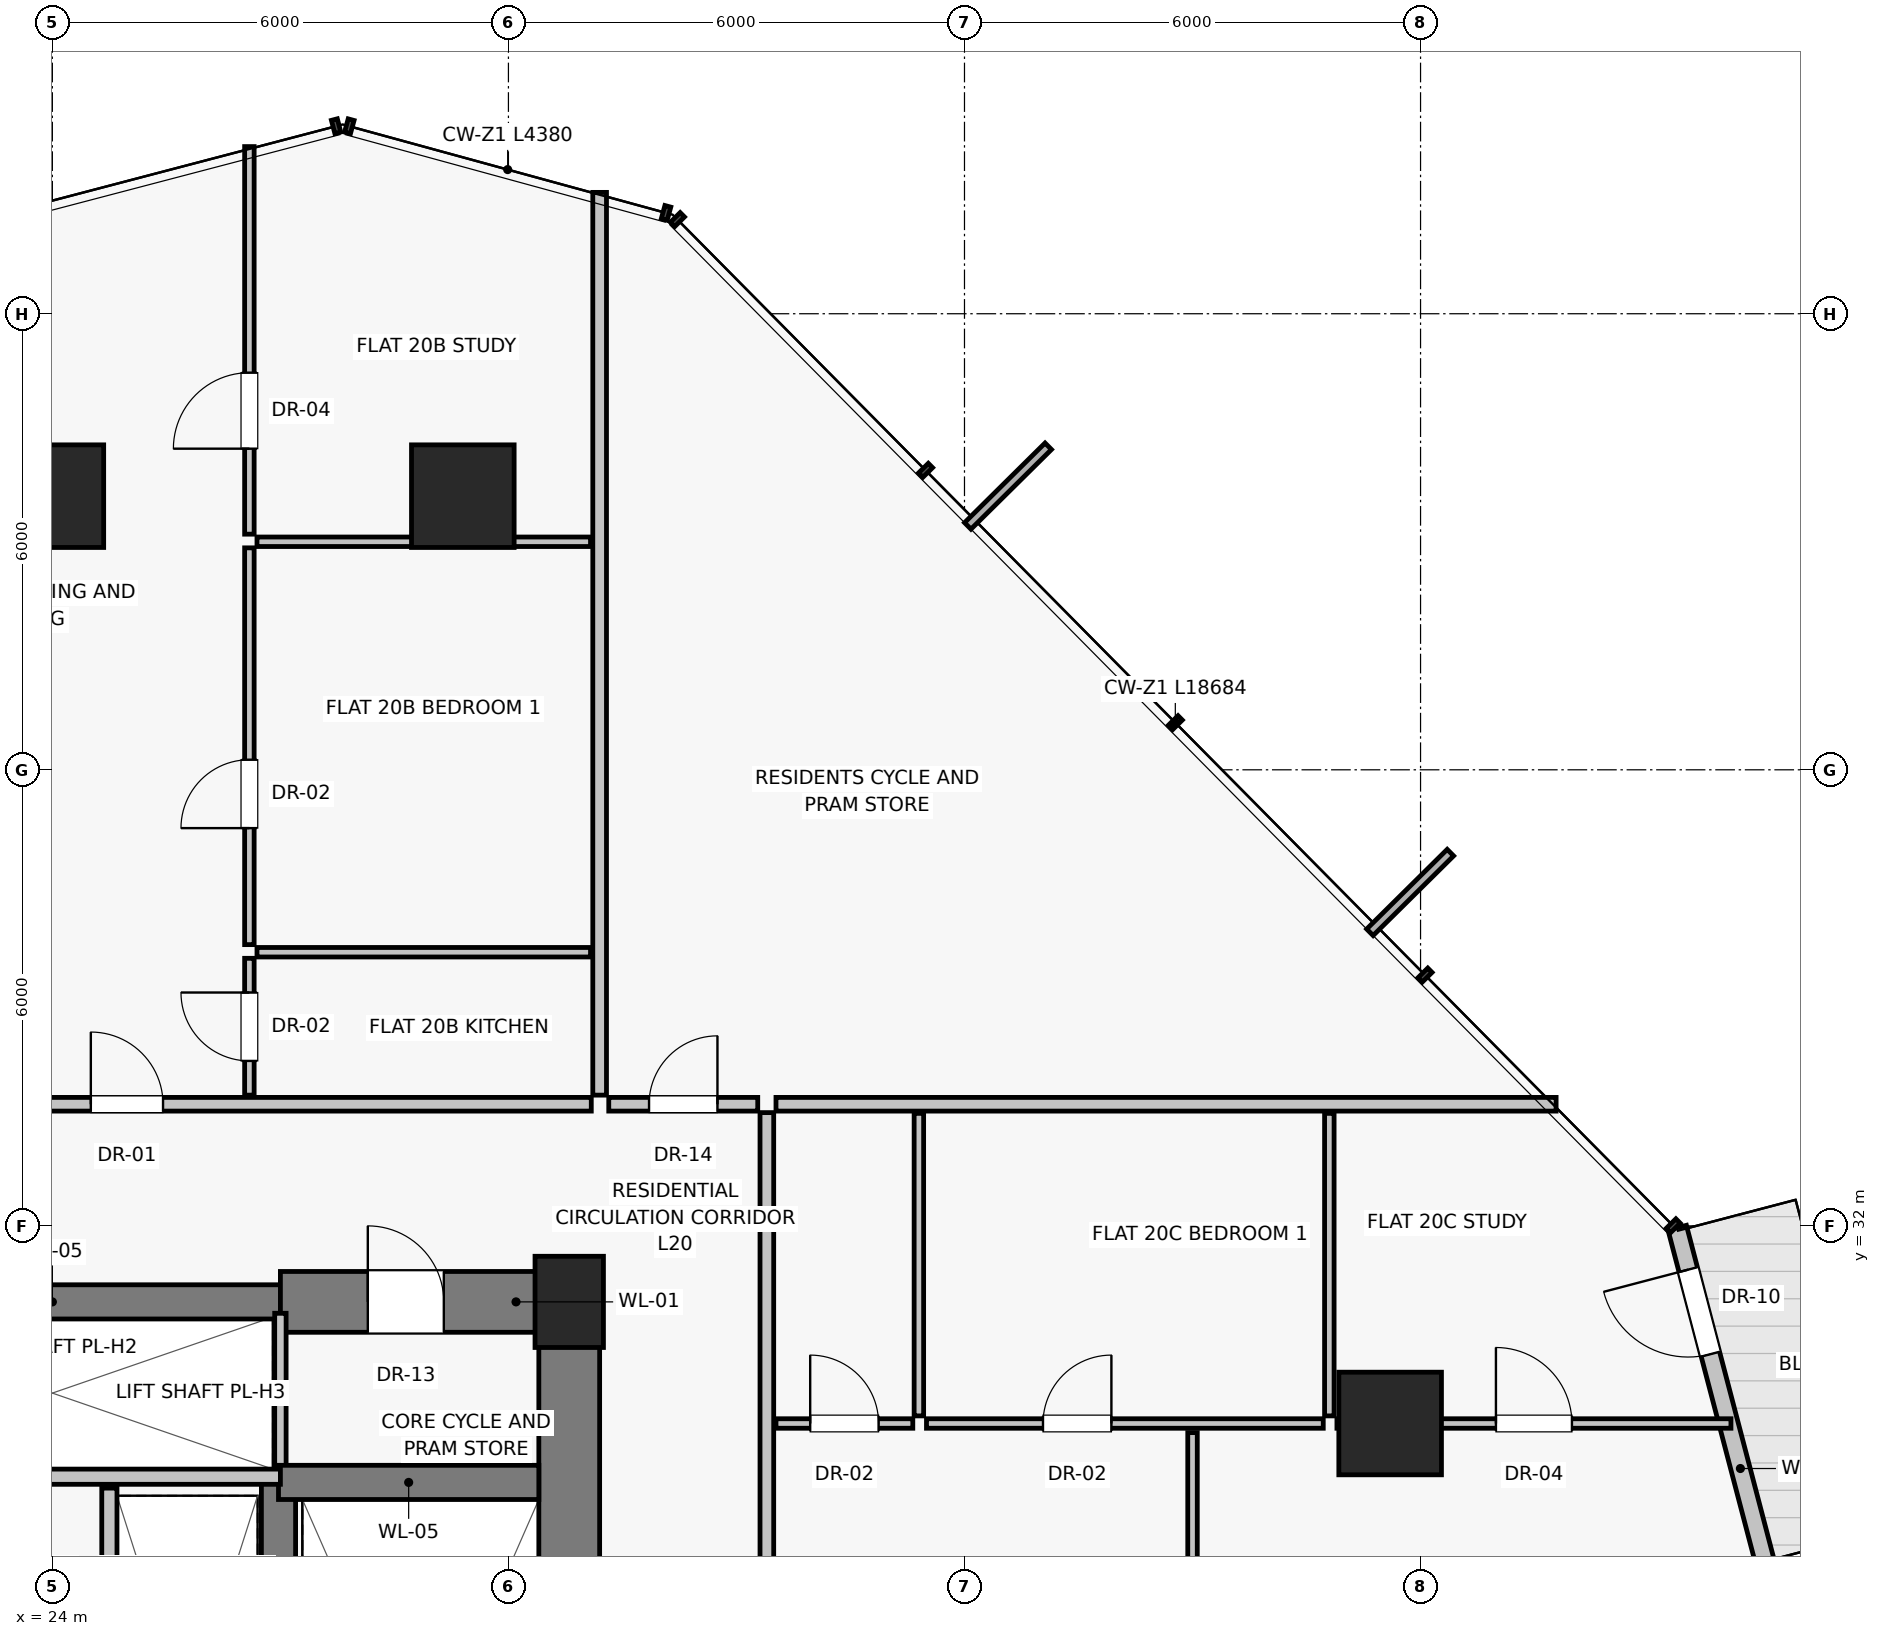
"""IFC4 building model, lengths in metres.
Left out: names, types, materials, properties, quantities, classifications, styles, units other than length and angle.
Written with IfcOpenShell. Run it as: python <this file> out.ifc"""

import sys

from ifc_helpers import new_model, si_unit, direction, frame, frame_2d, origin, origin_2d, place, context, subcontext, project, spatial, rectangle, extrude, source, transform, mapped, element, fill, save


model = new_model("IFC4")
c1 = context("Model", 3, precision=1e-05, world=origin(), true_north=direction((0.0, 1.0)))
c2 = subcontext(c1, "Body", "Model", "MODEL_VIEW")
j1 = project(units=[si_unit("LENGTHUNIT", "METRE"), si_unit("PLANEANGLEUNIT", "RADIAN")], contexts=[c1])
p1 = place(None, origin())
s1 = spatial("IfcSite", under=j1, at=p1, CompositionType="ELEMENT")
p2 = place(p1, origin())
s2 = spatial("IfcBuilding", under=s1, at=p2, CompositionType="ELEMENT")
p3 = place(p2, frame((0.0, 0.0, 73.85)))
s3 = spatial("IfcBuildingStorey", under=s2, at=p3, CompositionType="ELEMENT", Elevation=73.85)
p4 = place(p3, frame((30.8, 31.0, 0.0), z_axis=(0.0, 0.0, 1.0), x_axis=(1.0, 0.0, 0.0)))
e1 = element("IfcColumn", 1, at=p4, inside=s3, PredefinedType="PILASTER", context=c2, shape_type="SweptSolid", body=[
    extrude(rectangle(XDim=0.9, YDim=1.2, at=origin_2d()), origin(), (0.0, 0.0, 1.0), 3.25),
])
for number, where, z_axis, x_axis in (
    (2, (41.6, 29.4, 0.0), (0.0, 0.0, 1.0), (1.0, 0.0, 0.0)),
    (3, (29.4, 41.6, 0.0), (0.0, 0.0, 1.0), (1.0, 0.0, 0.0)),
    (4, (24.0, 41.6, 0.0), (0.0, 0.0, 1.0), (1.0, 0.0, 0.0)),
):
    element("IfcColumn", number, at=place(p3, frame(where, z_axis=z_axis, x_axis=x_axis)), inside=s3, PredefinedType="COLUMN", context=c2, shape_type="SweptSolid", body=[
        extrude(rectangle(XDim=1.35, YDim=1.35, at=origin_2d()), origin(), (0.0, 0.0, 1.0), 3.25),
    ])
p5 = place(p3, frame((46.539, 27.545, 0.0), z_axis=(0.0, 0.0, 1.0), x_axis=(-0.253782183119, 0.967261393591, 0.0)))
e5 = element("IfcWall", 5, at=p5, inside=s3, PredefinedType="SOLIDWALL", context=c2, shape_type="SweptSolid", body=[
    extrude(rectangle(XDim=4.58, YDim=0.25, at=frame_2d((2.29, 0.0))), origin(), (0.0, 0.0, 1.0), 3.0),
])
p6 = place(p5, frame((2.86, 0.0, 0.0)))
e6 = element("IfcOpeningElement", 6, at=p6, cuts=e5, PredefinedType="OPENING", context=c2, shape_type="SweptSolid", body=[
    extrude(rectangle(XDim=1.15, YDim=2.25, at=frame_2d((0.575, 1.125))), frame((0.0, 0.135, 0.0), z_axis=(0.0, -1.0, 0.0), x_axis=(1.0, 0.0, 0.0)), (0.0, 0.0, 1.0), 0.27),
])
p7 = place(p3, frame((30.8, 16.8, 0.0), z_axis=(0.0, 0.0, 1.0), x_axis=(0.0, 1.0, 0.0)))
e7 = element("IfcWall", 7, at=p7, inside=s3, PredefinedType="SHEAR", context=c2, shape_type="SweptSolid", body=[
    extrude(rectangle(XDim=14.2, YDim=0.8, at=frame_2d((7.1, 0.0))), origin(), (0.0, 0.0, 1.0), 3.0),
])
p8 = place(p3, frame((21.0, 31.0, 0.0), z_axis=(0.0, 0.0, 1.0), x_axis=(1.0, 0.0, 0.0)))
e8 = element("IfcWall", 8, at=p8, inside=s3, PredefinedType="SHEAR", context=c2, shape_type="SweptSolid", body=[
    extrude(rectangle(XDim=6.0, YDim=0.45, at=frame_2d((3.0, 0.0))), origin(), (0.0, 0.0, 1.0), 3.0),
])
p9 = place(p3, frame((27.0, 31.0, 0.0), z_axis=(0.0, 0.0, 1.0), x_axis=(1.0, 0.0, 0.0)))
e9 = element("IfcWall", 9, at=p9, inside=s3, PredefinedType="SHEAR", context=c2, shape_type="SweptSolid", body=[
    extrude(rectangle(XDim=3.8, YDim=0.8, at=frame_2d((1.9, 0.0))), origin(), (0.0, 0.0, 1.0), 3.0),
])
p10 = place(p9, frame((1.15, 0.0, 0.0)))
e10 = element("IfcOpeningElement", 10, at=p10, cuts=e9, PredefinedType="OPENING", context=c2, shape_type="SweptSolid", body=[
    extrude(rectangle(XDim=1.0, YDim=2.01, at=frame_2d((0.5, 1.005))), frame((0.0, 0.41, 0.0), z_axis=(0.0, -1.0, 0.0), x_axis=(1.0, 0.0, 0.0)), (0.0, 0.0, 1.0), 0.82),
])
p11 = place(p3, frame((27.0, 28.65, 0.0), z_axis=(0.0, 0.0, 1.0), x_axis=(0.0, 1.0, 0.0)))
e11 = element("IfcWall", 11, at=p11, inside=s3, PredefinedType="PARTITIONING", context=c2, shape_type="SweptSolid", body=[
    extrude(rectangle(XDim=2.2, YDim=0.15, at=frame_2d((1.1, 0.0))), origin(), (0.0, 0.0, 1.0), 3.0),
])
p12 = place(p3, frame((26.975, 19.8, 0.0), z_axis=(0.0, 0.0, 1.0), x_axis=(0.0, 1.0, 0.0)))
e12 = element("IfcWall", 12, at=p12, inside=s3, PredefinedType="SHEAR", context=c2, shape_type="SweptSolid", body=[
    extrude(rectangle(XDim=8.825, YDim=0.45, at=frame_2d((4.413, 0.0))), origin(), (0.0, 0.0, 1.0), 3.0),
])
p13 = place(p3, frame((26.975, 28.625, 0.0), z_axis=(0.0, 0.0, 1.0), x_axis=(1.0, 0.0, 0.0)))
e13 = element("IfcWall", 13, at=p13, inside=s3, PredefinedType="SHEAR", context=c2, shape_type="SweptSolid", body=[
    extrude(rectangle(XDim=3.425, YDim=0.45, at=frame_2d((1.712, 0.0))), origin(), (0.0, 0.0, 1.0), 3.0),
])
p14 = place(p3, frame((21.0, 28.7, 0.0), z_axis=(0.0, 0.0, 1.0), x_axis=(1.0, 0.0, 0.0)))
e14 = element("IfcWall", 14, at=p14, inside=s3, PredefinedType="SOLIDWALL", context=c2, shape_type="SweptSolid", body=[
    extrude(rectangle(XDim=6.0, YDim=0.2, at=frame_2d((3.0, 0.0))), origin(), (0.0, 0.0, 1.0), 3.0),
])
p15 = place(p3, frame((24.75, 22.6, 0.0), z_axis=(0.0, 0.0, 1.0), x_axis=(0.0, 1.0, 0.0)))
e15 = element("IfcWall", 15, at=p15, inside=s3, PredefinedType="SOLIDWALL", context=c2, shape_type="SweptSolid", body=[
    extrude(rectangle(XDim=5.95, YDim=0.2, at=frame_2d((2.975, 0.0))), origin(), (0.0, 0.0, 1.0), 3.0),
])
p16 = place(p3, frame((31.2, 33.72, 0.0), z_axis=(0.0, 0.0, 1.0), x_axis=(0.0, 1.0, 0.0)))
e16 = element("IfcWall", 16, at=p16, inside=s3, PredefinedType="PARTITIONING", context=c2, shape_type="SweptSolid", body=[
    extrude(rectangle(XDim=11.876, YDim=0.18, at=frame_2d((5.938, 0.0))), origin(), (0.0, 0.0, 1.0), 3.0),
])
p17 = place(p3, frame((21.23, 33.6, 0.0), z_axis=(0.0, 0.0, 1.0), x_axis=(1.0, 0.0, 0.0)))
e17 = element("IfcWall", 17, at=p17, inside=s3, PredefinedType="PARTITIONING", context=c2, shape_type="SweptSolid", body=[
    extrude(rectangle(XDim=9.86, YDim=0.18, at=frame_2d((4.93, 0.0))), origin(), (0.0, 0.0, 1.0), 3.0),
])
p18 = place(p17, frame((3.276, 0.0, 0.0)))
e18 = element("IfcOpeningElement", 18, at=p18, cuts=e17, PredefinedType="OPENING", context=c2, shape_type="SweptSolid", body=[
    extrude(rectangle(XDim=0.95, YDim=2.02, at=frame_2d((0.475, 1.01))), frame((0.0, 0.1, 0.0), z_axis=(0.0, -1.0, 0.0), x_axis=(1.0, 0.0, 0.0)), (0.0, 0.0, 1.0), 0.2),
])
p19 = place(p3, frame((26.692, 41.0, 0.0), z_axis=(0.0, 0.0, 1.0), x_axis=(1.0, 0.0, 0.0)))
e19 = element("IfcWall", 19, at=p19, inside=s3, PredefinedType="PARTITIONING", context=c2, shape_type="SweptSolid", body=[
    extrude(rectangle(XDim=4.388, YDim=0.125, at=frame_2d((2.194, 0.0))), origin(), (0.0, 0.0, 1.0), 2.1),
])
p20 = place(p3, frame((26.592, 41.1, 0.0), z_axis=(0.0, 0.0, 1.0), x_axis=(0.0, 1.0, 0.0)))
e20 = element("IfcWall", 20, at=p20, inside=s3, PredefinedType="PARTITIONING", context=c2, shape_type="SweptSolid", body=[
    extrude(rectangle(XDim=5.099, YDim=0.125, at=frame_2d((2.549, 0.0))), origin(), (0.0, 0.0, 1.0), 3.0),
])
p21 = place(p20, frame((1.125, 0.0, 0.0)))
e21 = element("IfcOpeningElement", 21, at=p21, cuts=e20, PredefinedType="OPENING", context=c2, shape_type="SweptSolid", body=[
    extrude(rectangle(XDim=1.0, YDim=2.01, at=frame_2d((0.5, 1.005))), frame((0.0, 0.073, 0.0), z_axis=(0.0, -1.0, 0.0), x_axis=(1.0, 0.0, 0.0)), (0.0, 0.0, 1.0), 0.145),
])
p22 = place(p3, frame((26.592, 33.72, 0.0), z_axis=(0.0, 0.0, 1.0), x_axis=(0.0, 1.0, 0.0)))
e22 = element("IfcWall", 22, at=p22, inside=s3, PredefinedType="PARTITIONING", context=c2, shape_type="SweptSolid", body=[
    extrude(rectangle(XDim=1.8, YDim=0.125, at=frame_2d((0.9, 0.0))), origin(), (0.0, 0.0, 1.0), 3.0),
])
p23 = place(p22, frame((0.45, 0.0, 0.0)))
e23 = element("IfcOpeningElement", 23, at=p23, cuts=e22, PredefinedType="OPENING", context=c2, shape_type="SweptSolid", body=[
    extrude(rectangle(XDim=0.9, YDim=2.01, at=frame_2d((0.45, 1.005))), frame((0.0, 0.073, 0.0), z_axis=(0.0, -1.0, 0.0), x_axis=(1.0, 0.0, 0.0)), (0.0, 0.0, 1.0), 0.145),
])
p24 = place(p3, frame((26.692, 35.6, 0.0), z_axis=(0.0, 0.0, 1.0), x_axis=(1.0, 0.0, 0.0)))
e24 = element("IfcWall", 24, at=p24, inside=s3, PredefinedType="PARTITIONING", context=c2, shape_type="SweptSolid", body=[
    extrude(rectangle(XDim=4.388, YDim=0.125, at=frame_2d((2.194, 0.0))), origin(), (0.0, 0.0, 1.0), 3.0),
])
p25 = place(p3, frame((26.592, 35.7, 0.0), z_axis=(0.0, 0.0, 1.0), x_axis=(0.0, 1.0, 0.0)))
e25 = element("IfcWall", 25, at=p25, inside=s3, PredefinedType="PARTITIONING", context=c2, shape_type="SweptSolid", body=[
    extrude(rectangle(XDim=5.22, YDim=0.125, at=frame_2d((2.61, 0.0))), origin(), (0.0, 0.0, 1.0), 3.0),
])
p26 = place(p25, frame((1.533, 0.0, 0.0)))
e26 = element("IfcOpeningElement", 26, at=p26, cuts=e25, PredefinedType="OPENING", context=c2, shape_type="SweptSolid", body=[
    extrude(rectangle(XDim=0.9, YDim=2.01, at=frame_2d((0.45, 1.005))), frame((0.0, 0.073, 0.0), z_axis=(0.0, -1.0, 0.0), x_axis=(1.0, 0.0, 0.0)), (0.0, 0.0, 1.0), 0.145),
])
p27 = place(p3, frame((33.52, 33.6, 0.0), z_axis=(0.0, 0.0, 1.0), x_axis=(1.0, 0.0, 0.0)))
e27 = element("IfcWall", 27, at=p27, inside=s3, PredefinedType="PARTITIONING", context=c2, shape_type="SweptSolid", body=[
    extrude(rectangle(XDim=10.263, YDim=0.18, at=frame_2d((5.132, 0.0))), origin(), (0.0, 0.0, 1.0), 3.0),
])
p28 = place(p3, frame((33.4, 18.71, 0.0), z_axis=(0.0, 0.0, 1.0), x_axis=(0.0, 1.0, 0.0)))
e28 = element("IfcWall", 28, at=p28, inside=s3, PredefinedType="PARTITIONING", context=c2, shape_type="SweptSolid", body=[
    extrude(rectangle(XDim=14.78, YDim=0.18, at=frame_2d((7.39, 0.0))), origin(), (0.0, 0.0, 1.0), 3.0),
])
p29 = place(p28, frame((5.94, 0.0, 0.0)))
e29 = element("IfcOpeningElement", 29, at=p29, cuts=e28, PredefinedType="OPENING", context=c2, shape_type="SweptSolid", body=[
    extrude(rectangle(XDim=0.95, YDim=2.02, at=frame_2d((0.475, 1.01))), frame((0.0, 0.1, 0.0), z_axis=(0.0, -1.0, 0.0), x_axis=(1.0, 0.0, 0.0)), (0.0, 0.0, 1.0), 0.2),
])
p30 = place(p3, frame((40.8, 29.5, 0.0), z_axis=(0.0, 0.0, 1.0), x_axis=(0.0, 1.0, 0.0)))
e30 = element("IfcWall", 30, at=p30, inside=s3, PredefinedType="PARTITIONING", context=c2, shape_type="SweptSolid", body=[
    extrude(rectangle(XDim=3.98, YDim=0.125, at=frame_2d((1.99, 0.0))), origin(), (0.0, 0.0, 1.0), 3.0),
])
p31 = place(p3, frame((40.9, 29.4, 0.0), z_axis=(0.0, 0.0, 1.0), x_axis=(1.0, 0.0, 0.0)))
e31 = element("IfcWall", 31, at=p31, inside=s3, PredefinedType="PARTITIONING", context=c2, shape_type="SweptSolid", body=[
    extrude(rectangle(XDim=5.184, YDim=0.125, at=frame_2d((2.592, 0.0))), origin(), (0.0, 0.0, 1.0), 2.299),
])
p32 = place(p31, frame((2.092, 0.0, 0.0)))
e32 = element("IfcOpeningElement", 32, at=p32, cuts=e31, PredefinedType="OPENING", context=c2, shape_type="SweptSolid", body=[
    extrude(rectangle(XDim=1.0, YDim=2.01, at=frame_2d((0.5, 1.005))), frame((0.0, 0.073, 0.0), z_axis=(0.0, -1.0, 0.0), x_axis=(1.0, 0.0, 0.0)), (0.0, 0.0, 1.0), 0.145),
])
p33 = place(p3, frame((39.0, 18.72, 0.0), z_axis=(0.0, 0.0, 1.0), x_axis=(0.0, 1.0, 0.0)))
e33 = element("IfcWall", 33, at=p33, inside=s3, PredefinedType="PARTITIONING", context=c2, shape_type="SweptSolid", body=[
    extrude(rectangle(XDim=10.56, YDim=0.125, at=frame_2d((5.28, 0.0))), origin(), (0.0, 0.0, 1.0), 3.0),
])
p34 = place(p33, frame((4.78, 0.0, 0.0)))
e34 = element("IfcOpeningElement", 34, at=p34, cuts=e33, PredefinedType="OPENING", context=c2, shape_type="SweptSolid", body=[
    extrude(rectangle(XDim=1.0, YDim=2.01, at=frame_2d((0.5, 1.005))), frame((0.0, 0.073, 0.0), z_axis=(0.0, -1.0, 0.0), x_axis=(1.0, 0.0, 0.0)), (0.0, 0.0, 1.0), 0.145),
])
p35 = place(p3, frame((33.52, 29.4, 0.0), z_axis=(0.0, 0.0, 1.0), x_axis=(1.0, 0.0, 0.0)))
e35 = element("IfcWall", 35, at=p35, inside=s3, PredefinedType="PARTITIONING", context=c2, shape_type="SweptSolid", body=[
    extrude(rectangle(XDim=1.8, YDim=0.125, at=frame_2d((0.9, 0.0))), origin(), (0.0, 0.0, 1.0), 3.0),
])
p36 = place(p35, frame((0.45, 0.0, 0.0)))
e36 = element("IfcOpeningElement", 36, at=p36, cuts=e35, PredefinedType="OPENING", context=c2, shape_type="SweptSolid", body=[
    extrude(rectangle(XDim=0.9, YDim=2.01, at=frame_2d((0.45, 1.005))), frame((0.0, 0.073, 0.0), z_axis=(0.0, -1.0, 0.0), x_axis=(1.0, 0.0, 0.0)), (0.0, 0.0, 1.0), 0.145),
])
p37 = place(p3, frame((35.4, 29.5, 0.0), z_axis=(0.0, 0.0, 1.0), x_axis=(0.0, 1.0, 0.0)))
e37 = element("IfcWall", 37, at=p37, inside=s3, PredefinedType="PARTITIONING", context=c2, shape_type="SweptSolid", body=[
    extrude(rectangle(XDim=3.98, YDim=0.125, at=frame_2d((1.99, 0.0))), origin(), (0.0, 0.0, 1.0), 3.0),
])
p38 = place(p3, frame((35.5, 29.4, 0.0), z_axis=(0.0, 0.0, 1.0), x_axis=(1.0, 0.0, 0.0)))
e38 = element("IfcWall", 38, at=p38, inside=s3, PredefinedType="PARTITIONING", context=c2, shape_type="SweptSolid", body=[
    extrude(rectangle(XDim=5.22, YDim=0.125, at=frame_2d((2.61, 0.0))), origin(), (0.0, 0.0, 1.0), 2.299),
])
p39 = place(p38, frame((1.533, 0.0, 0.0)))
e39 = element("IfcOpeningElement", 39, at=p39, cuts=e38, PredefinedType="OPENING", context=c2, shape_type="SweptSolid", body=[
    extrude(rectangle(XDim=0.9, YDim=2.01, at=frame_2d((0.45, 1.005))), frame((0.0, 0.073, 0.0), z_axis=(0.0, -1.0, 0.0), x_axis=(1.0, 0.0, 0.0)), (0.0, 0.0, 1.0), 0.145),
])
p40 = place(p3, frame((31.32, 33.6, 0.0), z_axis=(0.0, 0.0, 1.0), x_axis=(1.0, 0.0, 0.0)))
e40 = element("IfcWall", 40, at=p40, inside=s3, PredefinedType="PARTITIONING", context=c2, shape_type="SweptSolid", body=[
    extrude(rectangle(XDim=1.96, YDim=0.18, at=frame_2d((0.98, 0.0))), origin(), (0.0, 0.0, 1.0), 3.0),
])
p41 = place(p40, frame((0.53, 0.0, 0.0)))
e41 = element("IfcOpeningElement", 41, at=p41, cuts=e40, PredefinedType="OPENING", context=c2, shape_type="SweptSolid", body=[
    extrude(rectangle(XDim=0.9, YDim=2.01, at=frame_2d((0.45, 1.005))), frame((0.0, 0.1, 0.0), z_axis=(0.0, -1.0, 0.0), x_axis=(1.0, 0.0, 0.0)), (0.0, 0.0, 1.0), 0.2),
])
m1 = source(origin(), c2, "Body", "SweptSolid", [
    extrude(rectangle(XDim=1.15, YDim=2.25, at=frame_2d((0.575, 1.125))), frame((0.0, 0.025, 0.0), z_axis=(0.0, -1.0, 0.0), x_axis=(1.0, 0.0, 0.0)), (0.0, 0.0, 1.0), 0.05),
])
p42 = place(p6, frame((1.15, 0.0, 0.0), z_axis=(0.0, 0.0, 1.0), x_axis=(-1.0, 0.0, 0.0)))
e42 = element("IfcDoor", 42, at=p42, inside=s3, OperationType="SINGLE_SWING_RIGHT", PredefinedType="DOOR", context=c2, shape_type="MappedRepresentation", body=[
    mapped(m1, transform((0.0, 0.0, 0.0), scale=1.0)),
])
fill(e6, e42)
m2 = source(origin(), c2, "Body", "SweptSolid", [
    extrude(rectangle(XDim=1.0, YDim=2.01, at=frame_2d((0.5, 1.005))), frame((0.0, 0.025, 0.0), z_axis=(0.0, -1.0, 0.0), x_axis=(1.0, 0.0, 0.0)), (0.0, 0.0, 1.0), 0.05),
])
p43 = place(p10, origin())
e43 = element("IfcDoor", 43, at=p43, inside=s3, OperationType="SINGLE_SWING_LEFT", PredefinedType="DOOR", context=c2, shape_type="MappedRepresentation", body=[
    mapped(m2, transform((0.0, 0.0, 0.0), scale=1.0)),
])
fill(e10, e43)
m3 = source(origin(), c2, "Body", "SweptSolid", [
    extrude(rectangle(XDim=0.95, YDim=2.02, at=frame_2d((0.475, 1.01))), frame((0.0, 0.025, 0.0), z_axis=(0.0, -1.0, 0.0), x_axis=(1.0, 0.0, 0.0)), (0.0, 0.0, 1.0), 0.05),
])
p44 = place(p18, origin())
e44 = element("IfcDoor", 44, at=p44, inside=s3, OperationType="SINGLE_SWING_LEFT", PredefinedType="DOOR", context=c2, shape_type="MappedRepresentation", body=[
    mapped(m3, transform((0.0, 0.0, 0.0), scale=1.0)),
])
fill(e18, e44)
p45 = place(p21, origin())
e45 = element("IfcDoor", 45, at=p45, inside=s3, OperationType="SINGLE_SWING_LEFT", PredefinedType="DOOR", context=c2, shape_type="MappedRepresentation", body=[
    mapped(m2, transform((0.0, 0.0, 0.0), scale=1.0)),
])
fill(e21, e45)
m4 = source(origin(), c2, "Body", "SweptSolid", [
    extrude(rectangle(XDim=0.9, YDim=2.01, at=frame_2d((0.45, 1.005))), frame((0.0, 0.025, 0.0), z_axis=(0.0, -1.0, 0.0), x_axis=(1.0, 0.0, 0.0)), (0.0, 0.0, 1.0), 0.05),
])
p46 = place(p23, origin())
e46 = element("IfcDoor", 46, at=p46, inside=s3, OperationType="SINGLE_SWING_RIGHT", PredefinedType="DOOR", context=c2, shape_type="MappedRepresentation", body=[
    mapped(m4, transform((0.0, 0.0, 0.0), scale=1.0)),
])
fill(e23, e46)
p47 = place(p26, origin())
e47 = element("IfcDoor", 47, at=p47, inside=s3, OperationType="SINGLE_SWING_LEFT", PredefinedType="DOOR", context=c2, shape_type="MappedRepresentation", body=[
    mapped(m4, transform((0.0, 0.0, 0.0), scale=1.0)),
])
fill(e26, e47)
p48 = place(p32, origin())
e48 = element("IfcDoor", 48, at=p48, inside=s3, OperationType="SINGLE_SWING_LEFT", PredefinedType="DOOR", context=c2, shape_type="MappedRepresentation", body=[
    mapped(m2, transform((0.0, 0.0, 0.0), scale=1.0)),
])
fill(e32, e48)
p49 = place(p36, origin())
e49 = element("IfcDoor", 49, at=p49, inside=s3, OperationType="SINGLE_SWING_LEFT", PredefinedType="DOOR", context=c2, shape_type="MappedRepresentation", body=[
    mapped(m4, transform((0.0, 0.0, 0.0), scale=1.0)),
])
fill(e36, e49)
p50 = place(p39, origin())
e50 = element("IfcDoor", 50, at=p50, inside=s3, OperationType="SINGLE_SWING_RIGHT", PredefinedType="DOOR", context=c2, shape_type="MappedRepresentation", body=[
    mapped(m4, transform((0.0, 0.0, 0.0), scale=1.0)),
])
fill(e39, e50)
p51 = place(p41, origin())
e51 = element("IfcDoor", 51, at=p51, inside=s3, OperationType="SINGLE_SWING_RIGHT", PredefinedType="DOOR", context=c2, shape_type="MappedRepresentation", body=[
    mapped(m4, transform((0.0, 0.0, 0.0), scale=1.0)),
])
fill(e41, e51)
save(model, sys.argv[1])
